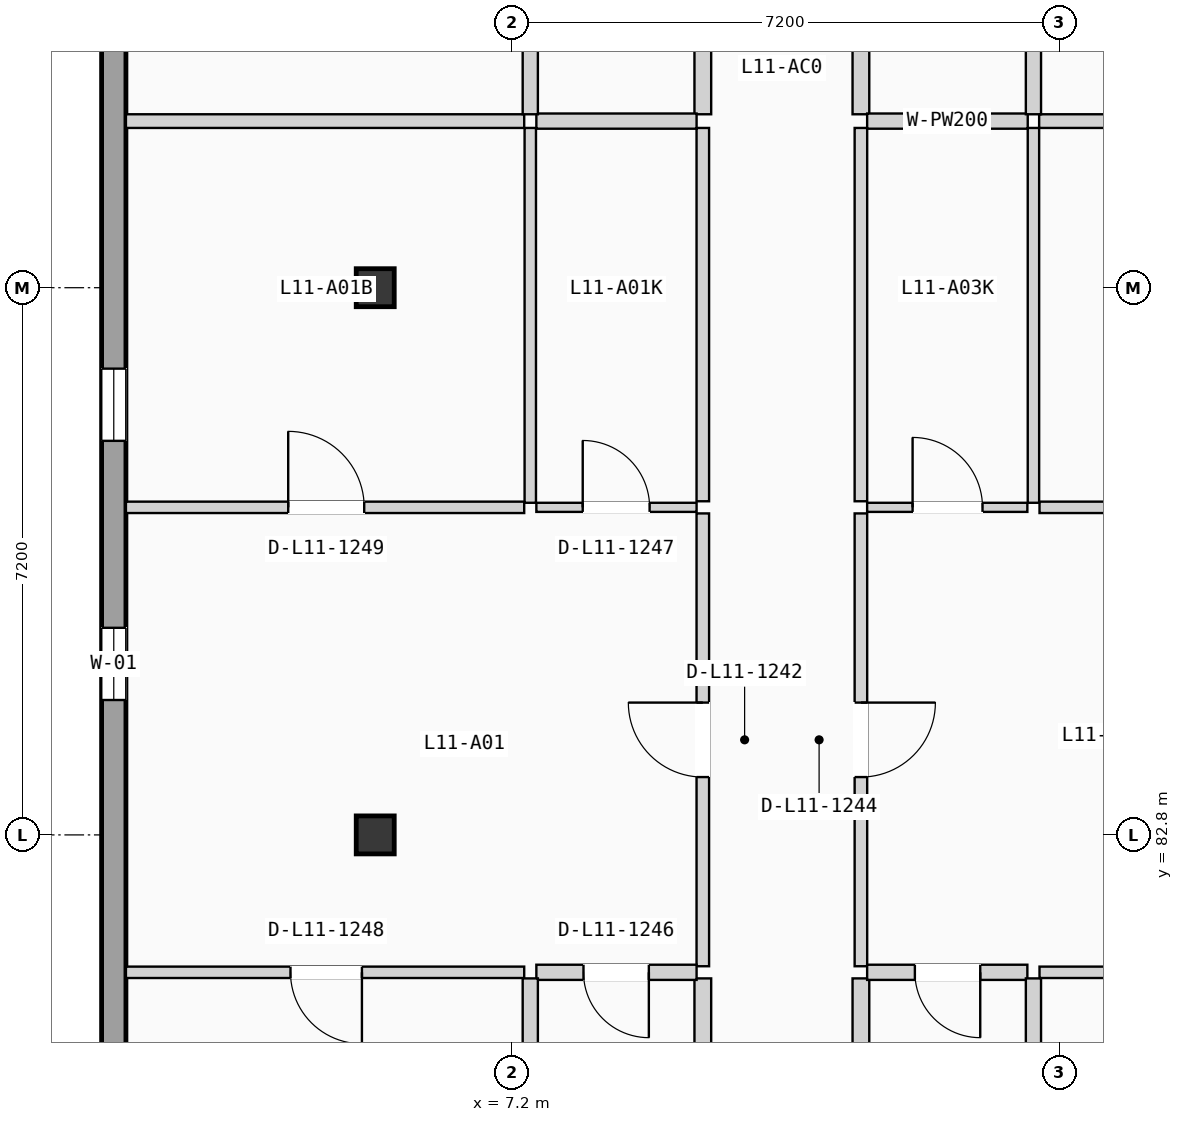
"""IFC4 building model, lengths in metres.
Left out: names, types, materials, properties, quantities, classifications, styles, units other than length and angle.
Written with IfcOpenShell. Run it as: python <this file> out.ifc"""

import sys

from ifc_helpers import new_model, si_unit, direction, frame, frame_2d, origin, origin_2d, place, context, subcontext, project, spatial, rectangle, extrude, element, fill, save


model = new_model("IFC4")
c1 = context("Model", 3, precision=1e-05, world=origin(), true_north=direction((0.0, 1.0)))
c2 = subcontext(c1, "Body", "Model", "MODEL_VIEW")
j1 = project(units=[si_unit("LENGTHUNIT", "METRE"), si_unit("PLANEANGLEUNIT", "RADIAN")], contexts=[c1])
p1 = place(None, origin())
s1 = spatial("IfcSite", under=j1, at=p1, CompositionType="ELEMENT")
p2 = place(p1, origin())
s2 = spatial("IfcBuilding", under=s1, at=p2, CompositionType="ELEMENT")
p3 = place(p2, frame((0.0, 0.0, 37.275)))
s3 = spatial("IfcBuildingStorey", under=s2, at=p3, CompositionType="ELEMENT", Elevation=37.275)
for number, where, z_axis, x_axis in (
    (1, (5.4, 82.8, 0.0), (0.0, 0.0, 1.0), (1.0, 0.0, 0.0)),
    (2, (5.4, 90.0, 0.0), (0.0, 0.0, 1.0), (1.0, 0.0, 0.0)),
):
    element("IfcColumn", number, at=place(p3, frame(where, z_axis=z_axis, x_axis=x_axis)), inside=s3, PredefinedType="COLUMN", context=c2, shape_type="SweptSolid", body=[
        extrude(rectangle(XDim=0.5, YDim=0.5, at=origin_2d()), origin(), (0.0, 0.0, 1.0), 3.15),
    ])
p4 = place(p3, frame((1.96, 68.72, 0.0), z_axis=(0.0, 0.0, 1.0), x_axis=(0.0, 1.0, 0.0)))
e3 = element("IfcWall", 3, at=p4, inside=s3, PredefinedType="SOLIDWALL", context=c2, shape_type="SweptSolid", body=[
    extrude(rectangle(XDim=49.76, YDim=0.32, at=frame_2d((24.88, 0.0))), origin(), (0.0, 0.0, 1.0), 2.9),
])
p5 = place(p4, frame((15.855, 0.0, 0.85)))
e4 = element("IfcOpeningElement", 4, at=p5, cuts=e3, PredefinedType="OPENING", context=c2, shape_type="SweptSolid", body=[
    extrude(rectangle(XDim=0.95, YDim=1.2, at=frame_2d((0.475, 0.6))), frame((0.0, 0.17, 0.0), z_axis=(0.0, -1.0, 0.0), x_axis=(1.0, 0.0, 0.0)), (0.0, 0.0, 1.0), 0.34),
])
p6 = place(p4, frame((8.586, 0.0, 0.9)))
e5 = element("IfcOpeningElement", 5, at=p6, cuts=e3, PredefinedType="OPENING", context=c2, shape_type="SweptSolid", body=[
    extrude(rectangle(XDim=2.3, YDim=1.2, at=frame_2d((1.15, 0.6))), frame((0.0, 0.17, 0.0), z_axis=(0.0, -1.0, 0.0), x_axis=(1.0, 0.0, 0.0)), (0.0, 0.0, 1.0), 0.34),
])
p7 = place(p4, frame((19.265, 0.0, 0.85)))
e6 = element("IfcOpeningElement", 6, at=p7, cuts=e3, PredefinedType="OPENING", context=c2, shape_type="SweptSolid", body=[
    extrude(rectangle(XDim=0.95, YDim=1.2, at=frame_2d((0.475, 0.6))), frame((0.0, 0.17, 0.0), z_axis=(0.0, -1.0, 0.0), x_axis=(1.0, 0.0, 0.0)), (0.0, 0.0, 1.0), 0.34),
])
p8 = place(p4, frame((31.309, 0.0, 0.715)))
e7 = element("IfcOpeningElement", 7, at=p8, cuts=e3, PredefinedType="OPENING", context=c2, shape_type="SweptSolid", body=[
    extrude(rectangle(XDim=2.3, YDim=1.5, at=frame_2d((1.15, 0.75))), frame((0.0, 0.17, 0.0), z_axis=(0.0, -1.0, 0.0), x_axis=(1.0, 0.0, 0.0)), (0.0, 0.0, 1.0), 0.34),
])
p9 = place(p4, frame((24.736, 0.0, 0.565)))
e8 = element("IfcOpeningElement", 8, at=p9, cuts=e3, PredefinedType="OPENING", context=c2, shape_type="SweptSolid", body=[
    extrude(rectangle(XDim=2.3, YDim=1.65, at=frame_2d((1.15, 0.825))), frame((0.0, 0.17, 0.0), z_axis=(0.0, -1.0, 0.0), x_axis=(1.0, 0.0, 0.0)), (0.0, 0.0, 1.0), 0.34),
])
p10 = place(p4, frame((39.113, 0.0, 0.85)))
e9 = element("IfcOpeningElement", 9, at=p10, cuts=e3, PredefinedType="OPENING", context=c2, shape_type="SweptSolid", body=[
    extrude(rectangle(XDim=0.95, YDim=1.2, at=frame_2d((0.475, 0.6))), frame((0.0, 0.17, 0.0), z_axis=(0.0, -1.0, 0.0), x_axis=(1.0, 0.0, 0.0)), (0.0, 0.0, 1.0), 0.34),
])
p11 = place(p3, frame((9.71, 81.072, 0.0), z_axis=(0.0, 0.0, 1.0), x_axis=(0.0, 1.0, 0.0)))
e10 = element("IfcWall", 10, at=p11, inside=s3, PredefinedType="PARTITIONING", context=c2, shape_type="SweptSolid", body=[
    extrude(rectangle(XDim=5.958, YDim=0.165, at=frame_2d((2.979, 0.0))), origin(), (0.0, 0.0, 1.0), 2.87),
])
p12 = place(p11, frame((2.489, 0.0, 0.0)))
e11 = element("IfcOpeningElement", 11, at=p12, cuts=e10, PredefinedType="OPENING", context=c2, shape_type="SweptSolid", body=[
    extrude(rectangle(XDim=0.98, YDim=2.08, at=frame_2d((0.49, 1.04))), frame((0.0, 0.093, 0.0), z_axis=(0.0, -1.0, 0.0), x_axis=(1.0, 0.0, 0.0)), (0.0, 0.0, 1.0), 0.185),
])
p13 = place(p3, frame((9.71, 76.0, 0.0), z_axis=(0.0, 0.0, 1.0), x_axis=(0.0, 1.0, 0.0)))
e12 = element("IfcWall", 12, at=p13, inside=s3, PredefinedType="PLUMBINGWALL", context=c2, shape_type="SweptSolid", body=[
    extrude(rectangle(XDim=4.912, YDim=0.22, at=frame_2d((2.456, 0.0))), origin(), (0.0, 0.0, 1.0), 2.87),
])
p14 = place(p3, frame((9.71, 87.19, 0.0), z_axis=(0.0, 0.0, 1.0), x_axis=(0.0, 1.0, 0.0)))
e13 = element("IfcWall", 13, at=p14, inside=s3, PredefinedType="PARTITIONING", context=c2, shape_type="SweptSolid", body=[
    extrude(rectangle(XDim=4.912, YDim=0.165, at=frame_2d((2.456, 0.0))), origin(), (0.0, 0.0, 1.0), 2.87),
])
p15 = place(p3, frame((9.71, 92.282, 0.0), z_axis=(0.0, 0.0, 1.0), x_axis=(0.0, 1.0, 0.0)))
e14 = element("IfcWall", 14, at=p15, inside=s3, PredefinedType="PLUMBINGWALL", context=c2, shape_type="SweptSolid", body=[
    extrude(rectangle(XDim=5.785, YDim=0.22, at=frame_2d((2.893, 0.0))), origin(), (0.0, 0.0, 1.0), 2.87),
])
p16 = place(p3, frame((11.79, 81.072, 0.0), z_axis=(0.0, 0.0, 1.0), x_axis=(0.0, 1.0, 0.0)))
e15 = element("IfcWall", 15, at=p16, inside=s3, PredefinedType="PARTITIONING", context=c2, shape_type="SweptSolid", body=[
    extrude(rectangle(XDim=5.958, YDim=0.165, at=frame_2d((2.979, 0.0))), origin(), (0.0, 0.0, 1.0), 2.87),
])
p17 = place(p16, frame((2.489, 0.0, 0.0)))
e16 = element("IfcOpeningElement", 16, at=p17, cuts=e15, PredefinedType="OPENING", context=c2, shape_type="SweptSolid", body=[
    extrude(rectangle(XDim=0.98, YDim=2.08, at=frame_2d((0.49, 1.04))), frame((0.0, 0.093, 0.0), z_axis=(0.0, -1.0, 0.0), x_axis=(1.0, 0.0, 0.0)), (0.0, 0.0, 1.0), 0.185),
])
p18 = place(p3, frame((11.79, 75.975, 0.0), z_axis=(0.0, 0.0, 1.0), x_axis=(0.0, 1.0, 0.0)))
e17 = element("IfcWall", 17, at=p18, inside=s3, PredefinedType="PLUMBINGWALL", context=c2, shape_type="SweptSolid", body=[
    extrude(rectangle(XDim=4.937, YDim=0.22, at=frame_2d((2.469, 0.0))), origin(), (0.0, 0.0, 1.0), 2.87),
])
p19 = place(p3, frame((11.79, 87.19, 0.0), z_axis=(0.0, 0.0, 1.0), x_axis=(0.0, 1.0, 0.0)))
e18 = element("IfcWall", 18, at=p19, inside=s3, PredefinedType="PARTITIONING", context=c2, shape_type="SweptSolid", body=[
    extrude(rectangle(XDim=4.912, YDim=0.165, at=frame_2d((2.456, 0.0))), origin(), (0.0, 0.0, 1.0), 2.87),
])
p20 = place(p3, frame((11.79, 92.282, 0.0), z_axis=(0.0, 0.0, 1.0), x_axis=(0.0, 1.0, 0.0)))
e19 = element("IfcWall", 19, at=p20, inside=s3, PredefinedType="PLUMBINGWALL", context=c2, shape_type="SweptSolid", body=[
    extrude(rectangle(XDim=5.785, YDim=0.22, at=frame_2d((2.893, 0.0))), origin(), (0.0, 0.0, 1.0), 2.87),
])
p21 = place(p3, frame((7.52, 80.992, 0.0), z_axis=(0.0, 0.0, 1.0), x_axis=(1.0, 0.0, 0.0)))
e20 = element("IfcWall", 20, at=p21, inside=s3, PredefinedType="PLUMBINGWALL", context=c2, shape_type="SweptSolid", body=[
    extrude(rectangle(XDim=2.108, YDim=0.2, at=frame_2d((1.054, 0.0))), origin(), (0.0, 0.0, 1.0), 2.87),
])
p22 = place(p21, frame((0.62, 0.0, 0.0)))
e21 = element("IfcOpeningElement", 21, at=p22, cuts=e20, PredefinedType="OPENING", context=c2, shape_type="SweptSolid", body=[
    extrude(rectangle(XDim=0.86, YDim=2.0, at=frame_2d((0.43, 1.0))), frame((0.0, 0.11, 0.0), z_axis=(0.0, -1.0, 0.0), x_axis=(1.0, 0.0, 0.0)), (0.0, 0.0, 1.0), 0.22),
])
p23 = place(p3, frame((7.52, 87.11, 0.0), z_axis=(0.0, 0.0, 1.0), x_axis=(1.0, 0.0, 0.0)))
e22 = element("IfcWall", 22, at=p23, inside=s3, PredefinedType="PARTITIONING", context=c2, shape_type="SweptSolid", body=[
    extrude(rectangle(XDim=2.108, YDim=0.12, at=frame_2d((1.054, 0.0))), origin(), (0.0, 0.0, 1.0), 2.87),
])
p24 = place(p23, frame((0.61, 0.0, 0.0)))
e23 = element("IfcOpeningElement", 23, at=p24, cuts=e22, PredefinedType="OPENING", context=c2, shape_type="SweptSolid", body=[
    extrude(rectangle(XDim=0.88, YDim=2.02, at=frame_2d((0.44, 1.01))), frame((0.0, 0.07, 0.0), z_axis=(0.0, -1.0, 0.0), x_axis=(1.0, 0.0, 0.0)), (0.0, 0.0, 1.0), 0.14),
])
p25 = place(p3, frame((2.12, 80.992, 0.0), z_axis=(0.0, 0.0, 1.0), x_axis=(1.0, 0.0, 0.0)))
e24 = element("IfcWall", 24, at=p25, inside=s3, PredefinedType="PARTITIONING", context=c2, shape_type="SweptSolid", body=[
    extrude(rectangle(XDim=5.24, YDim=0.15, at=frame_2d((2.62, 0.0))), origin(), (0.0, 0.0, 1.0), 2.87),
])
p26 = place(p25, frame((2.165, 0.0, 0.0)))
e25 = element("IfcOpeningElement", 25, at=p26, cuts=e24, PredefinedType="OPENING", context=c2, shape_type="SweptSolid", body=[
    extrude(rectangle(XDim=0.94, YDim=2.06, at=frame_2d((0.47, 1.03))), frame((0.0, 0.085, 0.0), z_axis=(0.0, -1.0, 0.0), x_axis=(1.0, 0.0, 0.0)), (0.0, 0.0, 1.0), 0.17),
])
p27 = place(p3, frame((2.12, 87.11, 0.0), z_axis=(0.0, 0.0, 1.0), x_axis=(1.0, 0.0, 0.0)))
e26 = element("IfcWall", 26, at=p27, inside=s3, PredefinedType="PARTITIONING", context=c2, shape_type="SweptSolid", body=[
    extrude(rectangle(XDim=5.24, YDim=0.15, at=frame_2d((2.62, 0.0))), origin(), (0.0, 0.0, 1.0), 2.87),
])
p28 = place(p27, frame((2.135, 0.0, 0.0)))
e27 = element("IfcOpeningElement", 27, at=p28, cuts=e26, PredefinedType="OPENING", context=c2, shape_type="SweptSolid", body=[
    extrude(rectangle(XDim=1.0, YDim=2.06, at=frame_2d((0.5, 1.03))), frame((0.0, 0.085, 0.0), z_axis=(0.0, -1.0, 0.0), x_axis=(1.0, 0.0, 0.0)), (0.0, 0.0, 1.0), 0.17),
])
p29 = place(p3, frame((7.44, 76.0, 0.0), z_axis=(0.0, 0.0, 1.0), x_axis=(0.0, 1.0, 0.0)))
e28 = element("IfcWall", 28, at=p29, inside=s3, PredefinedType="PLUMBINGWALL", context=c2, shape_type="SweptSolid", body=[
    extrude(rectangle(XDim=4.912, YDim=0.2, at=frame_2d((2.456, 0.0))), origin(), (0.0, 0.0, 1.0), 2.87),
])
p30 = place(p3, frame((7.44, 87.17, 0.0), z_axis=(0.0, 0.0, 1.0), x_axis=(0.0, 1.0, 0.0)))
e29 = element("IfcWall", 29, at=p30, inside=s3, PredefinedType="PARTITIONING", context=c2, shape_type="SweptSolid", body=[
    extrude(rectangle(XDim=4.932, YDim=0.15, at=frame_2d((2.466, 0.0))), origin(), (0.0, 0.0, 1.0), 2.87),
])
p31 = place(p3, frame((7.52, 92.192, 0.0), z_axis=(0.0, 0.0, 1.0), x_axis=(1.0, 0.0, 0.0)))
e30 = element("IfcWall", 30, at=p31, inside=s3, PredefinedType="PLUMBINGWALL", context=c2, shape_type="SweptSolid", body=[
    extrude(rectangle(XDim=2.108, YDim=0.2, at=frame_2d((1.054, 0.0))), origin(), (0.0, 0.0, 1.0), 2.87),
])
p32 = place(p3, frame((2.12, 92.192, 0.0), z_axis=(0.0, 0.0, 1.0), x_axis=(1.0, 0.0, 0.0)))
e31 = element("IfcWall", 31, at=p32, inside=s3, PredefinedType="PARTITIONING", context=c2, shape_type="SweptSolid", body=[
    extrude(rectangle(XDim=5.24, YDim=0.18, at=frame_2d((2.62, 0.0))), origin(), (0.0, 0.0, 1.0), 2.87),
])
p33 = place(p3, frame((7.44, 92.282, 0.0), z_axis=(0.0, 0.0, 1.0), x_axis=(0.0, 1.0, 0.0)))
e32 = element("IfcWall", 32, at=p33, inside=s3, PredefinedType="PLUMBINGWALL", context=c2, shape_type="SweptSolid", body=[
    extrude(rectangle(XDim=5.79, YDim=0.2, at=frame_2d((2.895, 0.0))), origin(), (0.0, 0.0, 1.0), 2.87),
])
p34 = place(p3, frame((11.872, 80.992, 0.0), z_axis=(0.0, 0.0, 1.0), x_axis=(1.0, 0.0, 0.0)))
e33 = element("IfcWall", 33, at=p34, inside=s3, PredefinedType="PLUMBINGWALL", context=c2, shape_type="SweptSolid", body=[
    extrude(rectangle(XDim=2.108, YDim=0.2, at=frame_2d((1.054, 0.0))), origin(), (0.0, 0.0, 1.0), 2.87),
])
p35 = place(p34, frame((0.628, 0.0, 0.0)))
e34 = element("IfcOpeningElement", 34, at=p35, cuts=e33, PredefinedType="OPENING", context=c2, shape_type="SweptSolid", body=[
    extrude(rectangle(XDim=0.86, YDim=2.0, at=frame_2d((0.43, 1.0))), frame((0.0, 0.11, 0.0), z_axis=(0.0, -1.0, 0.0), x_axis=(1.0, 0.0, 0.0)), (0.0, 0.0, 1.0), 0.22),
])
p36 = place(p3, frame((11.872, 87.11, 0.0), z_axis=(0.0, 0.0, 1.0), x_axis=(1.0, 0.0, 0.0)))
e35 = element("IfcWall", 35, at=p36, inside=s3, PredefinedType="PARTITIONING", context=c2, shape_type="SweptSolid", body=[
    extrude(rectangle(XDim=2.108, YDim=0.12, at=frame_2d((1.054, 0.0))), origin(), (0.0, 0.0, 1.0), 2.87),
])
p37 = place(p36, frame((0.598, 0.0, 0.0)))
e36 = element("IfcOpeningElement", 36, at=p37, cuts=e35, PredefinedType="OPENING", context=c2, shape_type="SweptSolid", body=[
    extrude(rectangle(XDim=0.92, YDim=2.02, at=frame_2d((0.46, 1.01))), frame((0.0, 0.07, 0.0), z_axis=(0.0, -1.0, 0.0), x_axis=(1.0, 0.0, 0.0)), (0.0, 0.0, 1.0), 0.14),
])
p38 = place(p3, frame((14.14, 80.992, 0.0), z_axis=(0.0, 0.0, 1.0), x_axis=(1.0, 0.0, 0.0)))
e37 = element("IfcWall", 37, at=p38, inside=s3, PredefinedType="PARTITIONING", context=c2, shape_type="SweptSolid", body=[
    extrude(rectangle(XDim=5.34, YDim=0.15, at=frame_2d((2.67, 0.0))), origin(), (0.0, 0.0, 1.0), 2.87),
])
p39 = place(p38, frame((2.185, 0.0, 0.0)))
e38 = element("IfcOpeningElement", 38, at=p39, cuts=e37, PredefinedType="OPENING", context=c2, shape_type="SweptSolid", body=[
    extrude(rectangle(XDim=0.94, YDim=2.06, at=frame_2d((0.47, 1.03))), frame((0.0, 0.085, 0.0), z_axis=(0.0, -1.0, 0.0), x_axis=(1.0, 0.0, 0.0)), (0.0, 0.0, 1.0), 0.17),
])
p40 = place(p3, frame((14.14, 87.11, 0.0), z_axis=(0.0, 0.0, 1.0), x_axis=(1.0, 0.0, 0.0)))
e39 = element("IfcWall", 39, at=p40, inside=s3, PredefinedType="PARTITIONING", context=c2, shape_type="SweptSolid", body=[
    extrude(rectangle(XDim=5.34, YDim=0.15, at=frame_2d((2.67, 0.0))), origin(), (0.0, 0.0, 1.0), 2.87),
])
p41 = place(p40, frame((2.155, 0.0, 0.0)))
e40 = element("IfcOpeningElement", 40, at=p41, cuts=e39, PredefinedType="OPENING", context=c2, shape_type="SweptSolid", body=[
    extrude(rectangle(XDim=1.0, YDim=2.06, at=frame_2d((0.5, 1.03))), frame((0.0, 0.085, 0.0), z_axis=(0.0, -1.0, 0.0), x_axis=(1.0, 0.0, 0.0)), (0.0, 0.0, 1.0), 0.17),
])
p42 = place(p3, frame((14.06, 75.975, 0.0), z_axis=(0.0, 0.0, 1.0), x_axis=(0.0, 1.0, 0.0)))
e41 = element("IfcWall", 41, at=p42, inside=s3, PredefinedType="PLUMBINGWALL", context=c2, shape_type="SweptSolid", body=[
    extrude(rectangle(XDim=4.937, YDim=0.2, at=frame_2d((2.469, 0.0))), origin(), (0.0, 0.0, 1.0), 2.87),
])
p43 = place(p3, frame((14.06, 87.17, 0.0), z_axis=(0.0, 0.0, 1.0), x_axis=(0.0, 1.0, 0.0)))
e42 = element("IfcWall", 42, at=p43, inside=s3, PredefinedType="PARTITIONING", context=c2, shape_type="SweptSolid", body=[
    extrude(rectangle(XDim=4.932, YDim=0.15, at=frame_2d((2.466, 0.0))), origin(), (0.0, 0.0, 1.0), 2.87),
])
p44 = place(p3, frame((11.872, 92.192, 0.0), z_axis=(0.0, 0.0, 1.0), x_axis=(1.0, 0.0, 0.0)))
e43 = element("IfcWall", 43, at=p44, inside=s3, PredefinedType="PLUMBINGWALL", context=c2, shape_type="SweptSolid", body=[
    extrude(rectangle(XDim=2.113, YDim=0.2, at=frame_2d((1.057, 0.0))), origin(), (0.0, 0.0, 1.0), 2.87),
])
p45 = place(p3, frame((14.135, 92.192, 0.0), z_axis=(0.0, 0.0, 1.0), x_axis=(1.0, 0.0, 0.0)))
e44 = element("IfcWall", 44, at=p45, inside=s3, PredefinedType="PARTITIONING", context=c2, shape_type="SweptSolid", body=[
    extrude(rectangle(XDim=5.345, YDim=0.18, at=frame_2d((2.672, 0.0))), origin(), (0.0, 0.0, 1.0), 2.87),
])
p46 = place(p3, frame((14.06, 92.282, 0.0), z_axis=(0.0, 0.0, 1.0), x_axis=(0.0, 1.0, 0.0)))
e45 = element("IfcWall", 45, at=p46, inside=s3, PredefinedType="PLUMBINGWALL", context=c2, shape_type="SweptSolid", body=[
    extrude(rectangle(XDim=5.79, YDim=0.2, at=frame_2d((2.895, 0.0))), origin(), (0.0, 0.0, 1.0), 2.87),
])
p47 = place(p5, origin())
e46 = element("IfcWindow", 46, at=p47, inside=s3, PartitioningType="SINGLE_PANEL", PredefinedType="WINDOW", context=c2, shape_type="SweptSolid", body=[
    extrude(rectangle(XDim=0.95, YDim=1.2, at=frame_2d((0.475, 0.6))), frame((0.0, 0.03, 0.0), z_axis=(0.0, -1.0, 0.0), x_axis=(1.0, 0.0, 0.0)), (0.0, 0.0, 1.0), 0.06),
])
fill(e4, e46)
p48 = place(p7, origin())
e47 = element("IfcWindow", 47, at=p48, inside=s3, PartitioningType="SINGLE_PANEL", PredefinedType="WINDOW", context=c2, shape_type="SweptSolid", body=[
    extrude(rectangle(XDim=0.95, YDim=1.2, at=frame_2d((0.475, 0.6))), frame((0.0, 0.03, 0.0), z_axis=(0.0, -1.0, 0.0), x_axis=(1.0, 0.0, 0.0)), (0.0, 0.0, 1.0), 0.06),
])
fill(e6, e47)
p49 = place(p12, origin())
e48 = element("IfcDoor", 48, at=p49, inside=s3, OperationType="SINGLE_SWING_RIGHT", PredefinedType="DOOR", context=c2, shape_type="SweptSolid", body=[
    extrude(rectangle(XDim=0.98, YDim=2.08, at=frame_2d((0.49, 1.04))), frame((0.0, 0.025, 0.0), z_axis=(0.0, -1.0, 0.0), x_axis=(1.0, 0.0, 0.0)), (0.0, 0.0, 1.0), 0.05),
])
fill(e11, e48)
p50 = place(p17, frame((0.98, 0.0, 0.0), z_axis=(0.0, 0.0, 1.0), x_axis=(-1.0, 0.0, 0.0)))
e49 = element("IfcDoor", 49, at=p50, inside=s3, OperationType="SINGLE_SWING_RIGHT", PredefinedType="DOOR", context=c2, shape_type="SweptSolid", body=[
    extrude(rectangle(XDim=0.98, YDim=2.08, at=frame_2d((0.49, 1.04))), frame((0.0, 0.025, 0.0), z_axis=(0.0, -1.0, 0.0), x_axis=(1.0, 0.0, 0.0)), (0.0, 0.0, 1.0), 0.05),
])
fill(e16, e49)
p51 = place(p22, frame((0.86, 0.0, 0.0), z_axis=(0.0, 0.0, 1.0), x_axis=(-1.0, 0.0, 0.0)))
e50 = element("IfcDoor", 50, at=p51, inside=s3, OperationType="SINGLE_SWING_RIGHT", PredefinedType="DOOR", context=c2, shape_type="SweptSolid", body=[
    extrude(rectangle(XDim=0.86, YDim=2.0, at=frame_2d((0.43, 1.0))), frame((0.0, 0.025, 0.0), z_axis=(0.0, -1.0, 0.0), x_axis=(1.0, 0.0, 0.0)), (0.0, 0.0, 1.0), 0.05),
])
fill(e21, e50)
p52 = place(p24, origin())
e51 = element("IfcDoor", 51, at=p52, inside=s3, OperationType="SINGLE_SWING_LEFT", PredefinedType="DOOR", context=c2, shape_type="SweptSolid", body=[
    extrude(rectangle(XDim=0.88, YDim=2.02, at=frame_2d((0.44, 1.01))), frame((0.0, 0.025, 0.0), z_axis=(0.0, -1.0, 0.0), x_axis=(1.0, 0.0, 0.0)), (0.0, 0.0, 1.0), 0.05),
])
fill(e23, e51)
p53 = place(p26, frame((0.94, 0.0, 0.0), z_axis=(0.0, 0.0, 1.0), x_axis=(-1.0, 0.0, 0.0)))
e52 = element("IfcDoor", 52, at=p53, inside=s3, OperationType="SINGLE_SWING_RIGHT", PredefinedType="DOOR", context=c2, shape_type="SweptSolid", body=[
    extrude(rectangle(XDim=0.94, YDim=2.06, at=frame_2d((0.47, 1.03))), frame((0.0, 0.025, 0.0), z_axis=(0.0, -1.0, 0.0), x_axis=(1.0, 0.0, 0.0)), (0.0, 0.0, 1.0), 0.05),
])
fill(e25, e52)
p54 = place(p28, origin())
e53 = element("IfcDoor", 53, at=p54, inside=s3, OperationType="SINGLE_SWING_LEFT", PredefinedType="DOOR", context=c2, shape_type="SweptSolid", body=[
    extrude(rectangle(XDim=1.0, YDim=2.06, at=frame_2d((0.5, 1.03))), frame((0.0, 0.025, 0.0), z_axis=(0.0, -1.0, 0.0), x_axis=(1.0, 0.0, 0.0)), (0.0, 0.0, 1.0), 0.05),
])
fill(e27, e53)
p55 = place(p35, frame((0.86, 0.0, 0.0), z_axis=(0.0, 0.0, 1.0), x_axis=(-1.0, 0.0, 0.0)))
e54 = element("IfcDoor", 54, at=p55, inside=s3, OperationType="SINGLE_SWING_RIGHT", PredefinedType="DOOR", context=c2, shape_type="SweptSolid", body=[
    extrude(rectangle(XDim=0.86, YDim=2.0, at=frame_2d((0.43, 1.0))), frame((0.0, 0.025, 0.0), z_axis=(0.0, -1.0, 0.0), x_axis=(1.0, 0.0, 0.0)), (0.0, 0.0, 1.0), 0.05),
])
fill(e34, e54)
p56 = place(p37, origin())
e55 = element("IfcDoor", 55, at=p56, inside=s3, OperationType="SINGLE_SWING_LEFT", PredefinedType="DOOR", context=c2, shape_type="SweptSolid", body=[
    extrude(rectangle(XDim=0.92, YDim=2.02, at=frame_2d((0.46, 1.01))), frame((0.0, 0.025, 0.0), z_axis=(0.0, -1.0, 0.0), x_axis=(1.0, 0.0, 0.0)), (0.0, 0.0, 1.0), 0.05),
])
fill(e36, e55)
save(model, sys.argv[1])
